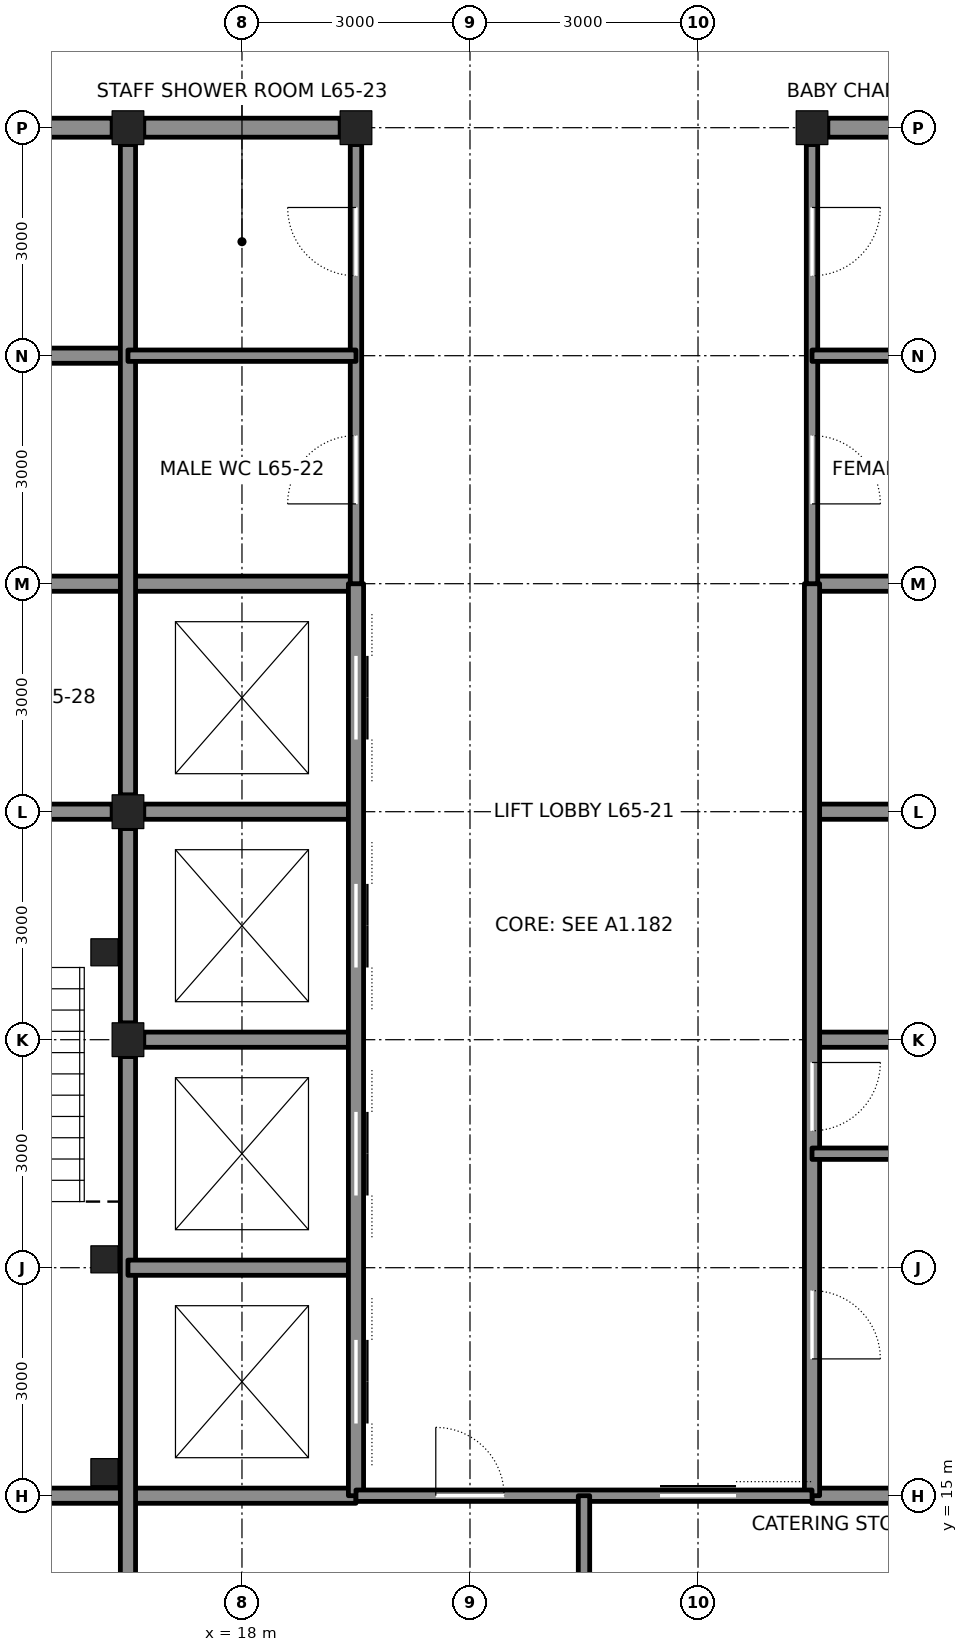
"""IFC4 building model, lengths in metres.
Left out: names, types, materials, properties, quantities, classifications, styles, units other than length and angle.
Written with IfcOpenShell. Run it as: python <this file> out.ifc"""

import sys

from ifc_helpers import new_model, si_unit, direction, frame, frame_2d, origin, origin_2d, place, context, subcontext, project, spatial, rectangle, hollow_rectangle, i_section, extrude, element, fill, save


model = new_model("IFC4")
c1 = context("Model", 3, precision=1e-05, world=origin(), true_north=direction((0.0, 1.0)))
c2 = subcontext(c1, "Body", "Model", "MODEL_VIEW")
j1 = project(units=[si_unit("LENGTHUNIT", "METRE"), si_unit("PLANEANGLEUNIT", "RADIAN")], contexts=[c1])
p1 = place(None, origin())
s1 = spatial("IfcSite", under=j1, at=p1, CompositionType="ELEMENT")
p2 = place(p1, origin())
s2 = spatial("IfcBuilding", under=s1, at=p2, CompositionType="ELEMENT")
p3 = place(p2, frame((0.0, 0.0, 291.6)))
s3 = spatial("IfcBuildingStorey", under=s2, at=p3, CompositionType="ELEMENT", Elevation=291.6)
for number, where, z_axis, x_axis in (
    (1, (16.5, 33.0, 0.0), (0.0, 0.0, 1.0), (1.0, 0.0, 0.0)),
    (2, (19.5, 33.0, 0.0), (0.0, 0.0, 1.0), (1.0, 0.0, 0.0)),
    (3, (25.5, 33.0, 0.0), (0.0, 0.0, 1.0), (1.0, 0.0, 0.0)),
    (4, (16.5, 21.0, 0.0), (0.0, 0.0, 1.0), (1.0, 0.0, 0.0)),
    (5, (16.5, 24.0, 0.0), (0.0, 0.0, 1.0), (1.0, 0.0, 0.0)),
):
    element("IfcColumn", number, at=place(p3, frame(where, z_axis=z_axis, x_axis=x_axis)), inside=s3, PredefinedType="COLUMN", context=c2, shape_type="SweptSolid", body=[
        extrude(i_section(OverallWidth=0.417, OverallDepth=0.445, WebThickness=0.039, FlangeThickness=0.063, at=origin_2d()), origin(), (0.0, 0.0, 1.0), 4.2),
    ])
for number, where, z_axis, x_axis in (
    (6, (12.0, 15.0, 0.0), (0.0, 0.0, 1.0), (1.0, 0.0, 0.0)),
    (7, (25.5, 15.0, 0.0), (0.0, 0.0, 1.0), (1.0, 0.0, 0.0)),
):
    element("IfcWall", number, at=place(p3, frame(where, z_axis=z_axis, x_axis=x_axis)), inside=s3, PredefinedType="SOLIDWALL", context=c2, shape_type="SweptSolid", body=[
        extrude(rectangle(XDim=7.5, YDim=0.2, at=frame_2d((3.75, 0.0))), origin(), (0.0, 0.0, 1.0), 4.04),
    ])
p4 = place(p3, frame((12.208, 24.0, 0.0), z_axis=(0.0, 0.0, 1.0), x_axis=(1.0, 0.0, 0.0)))
e8 = element("IfcWall", 8, at=p4, inside=s3, PredefinedType="SOLIDWALL", context=c2, shape_type="SweptSolid", body=[
    extrude(rectangle(XDim=4.083, YDim=0.2, at=frame_2d((2.042, 0.0))), origin(), (0.0, 0.0, 1.0), 3.09),
])
p5 = place(p4, frame((1.442, 0.0, 0.0)))
e9 = element("IfcOpeningElement", 9, at=p5, cuts=e8, PredefinedType="OPENING", context=c2, shape_type="SweptSolid", body=[
    extrude(rectangle(XDim=1.2, YDim=2.1, at=frame_2d((0.6, 1.05))), frame((0.0, 0.11, 0.0), z_axis=(0.0, -1.0, 0.0), x_axis=(1.0, 0.0, 0.0)), (0.0, 0.0, 1.0), 0.22),
])
for number, where, z_axis, x_axis in (
    (10, (16.708, 24.0, 0.0), (0.0, 0.0, 1.0), (1.0, 0.0, 0.0)),
    (11, (25.5, 24.0, 0.0), (0.0, 0.0, 1.0), (1.0, 0.0, 0.0)),
):
    element("IfcWall", number, at=place(p3, frame(where, z_axis=z_axis, x_axis=x_axis)), inside=s3, PredefinedType="SOLIDWALL", context=c2, shape_type="SweptSolid", body=[
        extrude(rectangle(XDim=2.792, YDim=0.2, at=frame_2d((1.396, 0.0))), origin(), (0.0, 0.0, 1.0), 3.09),
    ])
p6 = place(p3, frame((12.0, 27.0, 0.0), z_axis=(0.0, 0.0, 1.0), x_axis=(1.0, 0.0, 0.0)))
e12 = element("IfcWall", 12, at=p6, inside=s3, PredefinedType="SOLIDWALL", context=c2, shape_type="SweptSolid", body=[
    extrude(rectangle(XDim=7.5, YDim=0.2, at=frame_2d((3.75, 0.0))), origin(), (0.0, 0.0, 1.0), 4.04),
])
p7 = place(p6, frame((1.65, 0.0, 0.0)))
e13 = element("IfcOpeningElement", 13, at=p7, cuts=e12, PredefinedType="OPENING", context=c2, shape_type="SweptSolid", body=[
    extrude(rectangle(XDim=1.2, YDim=2.1, at=frame_2d((0.6, 1.05))), frame((0.0, 0.11, 0.0), z_axis=(0.0, -1.0, 0.0), x_axis=(1.0, 0.0, 0.0)), (0.0, 0.0, 1.0), 0.22),
])
p8 = place(p3, frame((25.5, 27.0, 0.0), z_axis=(0.0, 0.0, 1.0), x_axis=(1.0, 0.0, 0.0)))
e14 = element("IfcWall", 14, at=p8, inside=s3, PredefinedType="SOLIDWALL", context=c2, shape_type="SweptSolid", body=[
    extrude(rectangle(XDim=3.0, YDim=0.2, at=frame_2d((1.5, 0.0))), origin(), (0.0, 0.0, 1.0), 4.04),
])
p9 = place(p3, frame((12.0, 30.0, 0.0), z_axis=(0.0, 0.0, 1.0), x_axis=(1.0, 0.0, 0.0)))
e15 = element("IfcWall", 15, at=p9, inside=s3, PredefinedType="SOLIDWALL", context=c2, shape_type="SweptSolid", body=[
    extrude(rectangle(XDim=4.5, YDim=0.2, at=frame_2d((2.25, 0.0))), origin(), (0.0, 0.0, 1.0), 4.04),
])
p10 = place(p3, frame((12.25, 33.0, 0.0), z_axis=(0.0, 0.0, 1.0), x_axis=(1.0, 0.0, 0.0)))
e16 = element("IfcWall", 16, at=p10, inside=s3, PredefinedType="SOLIDWALL", context=c2, shape_type="SweptSolid", body=[
    extrude(rectangle(XDim=4.042, YDim=0.25, at=frame_2d((2.021, 0.0))), origin(), (0.0, 0.0, 1.0), 3.181),
])
for number, where, z_axis, x_axis in (
    (17, (16.708, 33.0, 0.0), (0.0, 0.0, 1.0), (1.0, 0.0, 0.0)),
    (18, (25.708, 33.0, 0.0), (0.0, 0.0, 1.0), (1.0, 0.0, 0.0)),
):
    element("IfcWall", number, at=place(p3, frame(where, z_axis=z_axis, x_axis=x_axis)), inside=s3, PredefinedType="SOLIDWALL", context=c2, shape_type="SweptSolid", body=[
        extrude(rectangle(XDim=2.583, YDim=0.25, at=frame_2d((1.292, 0.0))), origin(), (0.0, 0.0, 1.0), 3.181),
    ])
p11 = place(p3, frame((16.5, 12.222, 0.0), z_axis=(0.0, 0.0, 1.0), x_axis=(0.0, 1.0, 0.0)))
e19 = element("IfcWall", 19, at=p11, inside=s3, PredefinedType="SOLIDWALL", context=c2, shape_type="SweptSolid", body=[
    extrude(rectangle(XDim=8.555, YDim=0.2, at=frame_2d((4.278, 0.0))), origin(), (0.0, 0.0, 1.0), 3.113),
])
p12 = place(p3, frame((16.5, 21.222, 0.0), z_axis=(0.0, 0.0, 1.0), x_axis=(0.0, 1.0, 0.0)))
e20 = element("IfcWall", 20, at=p12, inside=s3, PredefinedType="SOLIDWALL", context=c2, shape_type="SweptSolid", body=[
    extrude(rectangle(XDim=2.555, YDim=0.2, at=frame_2d((1.278, 0.0))), origin(), (0.0, 0.0, 1.0), 3.113),
])
p13 = place(p3, frame((16.5, 24.222, 0.0), z_axis=(0.0, 0.0, 1.0), x_axis=(0.0, 1.0, 0.0)))
e21 = element("IfcWall", 21, at=p13, inside=s3, PredefinedType="SOLIDWALL", context=c2, shape_type="SweptSolid", body=[
    extrude(rectangle(XDim=8.555, YDim=0.2, at=frame_2d((4.278, 0.0))), origin(), (0.0, 0.0, 1.0), 3.113),
])
p14 = place(p3, frame((16.5, 18.0, 0.0), z_axis=(0.0, 0.0, 1.0), x_axis=(1.0, 0.0, 0.0)))
e22 = element("IfcWall", 22, at=p14, inside=s3, PredefinedType="SOLIDWALL", context=c2, shape_type="SweptSolid", body=[
    extrude(rectangle(XDim=3.0, YDim=0.2, at=frame_2d((1.5, 0.0))), origin(), (0.0, 0.0, 1.0), 4.04),
])
for number, where, z_axis, x_axis in (
    (23, (16.708, 21.0, 0.0), (0.0, 0.0, 1.0), (1.0, 0.0, 0.0)),
    (24, (25.5, 21.0, 0.0), (0.0, 0.0, 1.0), (1.0, 0.0, 0.0)),
):
    element("IfcWall", number, at=place(p3, frame(where, z_axis=z_axis, x_axis=x_axis)), inside=s3, PredefinedType="SOLIDWALL", context=c2, shape_type="SweptSolid", body=[
        extrude(rectangle(XDim=2.792, YDim=0.2, at=frame_2d((1.396, 0.0))), origin(), (0.0, 0.0, 1.0), 3.09),
    ])
p15 = place(p3, frame((19.5, 15.0, 0.0), z_axis=(0.0, 0.0, 1.0), x_axis=(0.0, 1.0, 0.0)))
e25 = element("IfcWall", 25, at=p15, inside=s3, PredefinedType="SOLIDWALL", context=c2, shape_type="SweptSolid", body=[
    extrude(rectangle(XDim=12.0, YDim=0.2, at=frame_2d((6.0, 0.0))), origin(), (0.0, 0.0, 1.0), 3.064),
])
p16 = place(p15, frame((0.95, 0.0, 0.0)))
e26 = element("IfcOpeningElement", 26, at=p16, cuts=e25, PredefinedType="OPENING", context=c2, shape_type="SweptSolid", body=[
    extrude(rectangle(XDim=1.1, YDim=2.1, at=frame_2d((0.55, 1.05))), frame((0.0, 0.11, 0.0), z_axis=(0.0, -1.0, 0.0), x_axis=(1.0, 0.0, 0.0)), (0.0, 0.0, 1.0), 0.22),
])
p17 = place(p15, frame((3.95, 0.0, 0.0)))
e27 = element("IfcOpeningElement", 27, at=p17, cuts=e25, PredefinedType="OPENING", context=c2, shape_type="SweptSolid", body=[
    extrude(rectangle(XDim=1.1, YDim=2.1, at=frame_2d((0.55, 1.05))), frame((0.0, 0.11, 0.0), z_axis=(0.0, -1.0, 0.0), x_axis=(1.0, 0.0, 0.0)), (0.0, 0.0, 1.0), 0.22),
])
p18 = place(p15, frame((6.95, 0.0, 0.0)))
e28 = element("IfcOpeningElement", 28, at=p18, cuts=e25, PredefinedType="OPENING", context=c2, shape_type="SweptSolid", body=[
    extrude(rectangle(XDim=1.1, YDim=2.1, at=frame_2d((0.55, 1.05))), frame((0.0, 0.11, 0.0), z_axis=(0.0, -1.0, 0.0), x_axis=(1.0, 0.0, 0.0)), (0.0, 0.0, 1.0), 0.22),
])
p19 = place(p15, frame((9.95, 0.0, 0.0)))
e29 = element("IfcOpeningElement", 29, at=p19, cuts=e25, PredefinedType="OPENING", context=c2, shape_type="SweptSolid", body=[
    extrude(rectangle(XDim=1.1, YDim=2.1, at=frame_2d((0.55, 1.05))), frame((0.0, 0.11, 0.0), z_axis=(0.0, -1.0, 0.0), x_axis=(1.0, 0.0, 0.0)), (0.0, 0.0, 1.0), 0.22),
])
p20 = place(p3, frame((19.5, 27.0, 0.0), z_axis=(0.0, 0.0, 1.0), x_axis=(0.0, 1.0, 0.0)))
e30 = element("IfcWall", 30, at=p20, inside=s3, PredefinedType="PARTITIONING", context=c2, shape_type="SweptSolid", body=[
    extrude(rectangle(XDim=5.778, YDim=0.15, at=frame_2d((2.889, 0.0))), origin(), (0.0, 0.0, 1.0), 3.064),
])
p21 = place(p20, frame((1.05, 0.0, 0.0)))
e31 = element("IfcOpeningElement", 31, at=p21, cuts=e30, PredefinedType="OPENING", context=c2, shape_type="SweptSolid", body=[
    extrude(rectangle(XDim=0.9, YDim=2.1, at=frame_2d((0.45, 1.05))), frame((0.0, 0.085, 0.0), z_axis=(0.0, -1.0, 0.0), x_axis=(1.0, 0.0, 0.0)), (0.0, 0.0, 1.0), 0.17),
])
p22 = place(p20, frame((4.05, 0.0, 0.0)))
e32 = element("IfcOpeningElement", 32, at=p22, cuts=e30, PredefinedType="OPENING", context=c2, shape_type="SweptSolid", body=[
    extrude(rectangle(XDim=0.9, YDim=2.1, at=frame_2d((0.45, 1.05))), frame((0.0, 0.085, 0.0), z_axis=(0.0, -1.0, 0.0), x_axis=(1.0, 0.0, 0.0)), (0.0, 0.0, 1.0), 0.17),
])
p23 = place(p3, frame((25.5, 15.0, 0.0), z_axis=(0.0, 0.0, 1.0), x_axis=(0.0, 1.0, 0.0)))
e33 = element("IfcWall", 33, at=p23, inside=s3, PredefinedType="SOLIDWALL", context=c2, shape_type="SweptSolid", body=[
    extrude(rectangle(XDim=12.0, YDim=0.2, at=frame_2d((6.0, 0.0))), origin(), (0.0, 0.0, 1.0), 3.064),
])
p24 = place(p23, frame((1.8, 0.0, 0.0)))
e34 = element("IfcOpeningElement", 34, at=p24, cuts=e33, PredefinedType="OPENING", context=c2, shape_type="SweptSolid", body=[
    extrude(rectangle(XDim=0.9, YDim=2.1, at=frame_2d((0.45, 1.05))), frame((0.0, 0.11, 0.0), z_axis=(0.0, -1.0, 0.0), x_axis=(1.0, 0.0, 0.0)), (0.0, 0.0, 1.0), 0.22),
])
p25 = place(p23, frame((4.8, 0.0, 0.0)))
e35 = element("IfcOpeningElement", 35, at=p25, cuts=e33, PredefinedType="OPENING", context=c2, shape_type="SweptSolid", body=[
    extrude(rectangle(XDim=0.9, YDim=2.1, at=frame_2d((0.45, 1.05))), frame((0.0, 0.11, 0.0), z_axis=(0.0, -1.0, 0.0), x_axis=(1.0, 0.0, 0.0)), (0.0, 0.0, 1.0), 0.22),
])
p26 = place(p3, frame((25.5, 27.0, 0.0), z_axis=(0.0, 0.0, 1.0), x_axis=(0.0, 1.0, 0.0)))
e36 = element("IfcWall", 36, at=p26, inside=s3, PredefinedType="PARTITIONING", context=c2, shape_type="SweptSolid", body=[
    extrude(rectangle(XDim=5.778, YDim=0.15, at=frame_2d((2.889, 0.0))), origin(), (0.0, 0.0, 1.0), 3.064),
])
p27 = place(p26, frame((1.05, 0.0, 0.0)))
e37 = element("IfcOpeningElement", 37, at=p27, cuts=e36, PredefinedType="OPENING", context=c2, shape_type="SweptSolid", body=[
    extrude(rectangle(XDim=0.9, YDim=2.1, at=frame_2d((0.45, 1.05))), frame((0.0, 0.085, 0.0), z_axis=(0.0, -1.0, 0.0), x_axis=(1.0, 0.0, 0.0)), (0.0, 0.0, 1.0), 0.17),
])
p28 = place(p26, frame((4.05, 0.0, 0.0)))
e38 = element("IfcOpeningElement", 38, at=p28, cuts=e36, PredefinedType="OPENING", context=c2, shape_type="SweptSolid", body=[
    extrude(rectangle(XDim=0.9, YDim=2.1, at=frame_2d((0.45, 1.05))), frame((0.0, 0.085, 0.0), z_axis=(0.0, -1.0, 0.0), x_axis=(1.0, 0.0, 0.0)), (0.0, 0.0, 1.0), 0.17),
])
p29 = place(p3, frame((19.5, 15.0, 0.0), z_axis=(0.0, 0.0, 1.0), x_axis=(1.0, 0.0, 0.0)))
e39 = element("IfcWall", 39, at=p29, inside=s3, PredefinedType="PARTITIONING", context=c2, shape_type="SweptSolid", body=[
    extrude(rectangle(XDim=6.0, YDim=0.15, at=frame_2d((3.0, 0.0))), origin(), (0.0, 0.0, 1.0), 4.04),
])
p30 = place(p29, frame((4.0, 0.0, 0.0)))
e40 = element("IfcOpeningElement", 40, at=p30, cuts=e39, PredefinedType="OPENING", context=c2, shape_type="SweptSolid", body=[
    extrude(rectangle(XDim=1.0, YDim=2.1, at=frame_2d((0.5, 1.05))), frame((0.0, 0.085, 0.0), z_axis=(0.0, -1.0, 0.0), x_axis=(1.0, 0.0, 0.0)), (0.0, 0.0, 1.0), 0.17),
])
p31 = place(p29, frame((1.05, 0.0, 0.0)))
e41 = element("IfcOpeningElement", 41, at=p31, cuts=e39, PredefinedType="OPENING", context=c2, shape_type="SweptSolid", body=[
    extrude(rectangle(XDim=0.9, YDim=2.1, at=frame_2d((0.45, 1.05))), frame((0.0, 0.085, 0.0), z_axis=(0.0, -1.0, 0.0), x_axis=(1.0, 0.0, 0.0)), (0.0, 0.0, 1.0), 0.17),
])
for number, where, z_axis, x_axis in (
    (42, (22.5, 15.0, 0.0), (0.0, 0.0, 1.0), (0.0, -1.0, 0.0)),
    (43, (16.5, 30.0, 0.0), (0.0, 0.0, 1.0), (1.0, 0.0, 0.0)),
    (44, (25.5, 30.0, 0.0), (0.0, 0.0, 1.0), (1.0, 0.0, 0.0)),
    (45, (25.5, 19.5, 0.0), (0.0, 0.0, 1.0), (1.0, 0.0, 0.0)),
):
    element("IfcWall", number, at=place(p3, frame(where, z_axis=z_axis, x_axis=x_axis)), inside=s3, PredefinedType="PARTITIONING", context=c2, shape_type="SweptSolid", body=[
        extrude(rectangle(XDim=3.0, YDim=0.15, at=frame_2d((1.5, 0.0))), origin(), (0.0, 0.0, 1.0), 4.04),
    ])
for number, where, z_axis, x_axis in (
    (46, (16.19, 15.31, 0.0), (0.0, 0.0, 1.0), (1.0, 0.0, 0.0)),
    (47, (16.19, 18.11, 0.0), (0.0, 0.0, 1.0), (1.0, 0.0, 0.0)),
    (48, (16.19, 22.15, 0.0), (0.0, 0.0, 1.0), (1.0, 0.0, 0.0)),
):
    element("IfcColumn", number, at=place(p3, frame(where, z_axis=z_axis, x_axis=x_axis)), inside=s3, PredefinedType="COLUMN", context=c2, shape_type="SweptSolid", body=[
        extrude(hollow_rectangle(XDim=0.356, YDim=0.356, WallThickness=0.009, at=origin_2d()), origin(), (0.0, 0.0, 1.0), 4.2),
    ])
p32 = place(p21, origin())
e49 = element("IfcDoor", 49, at=p32, inside=s3, OperationType="SINGLE_SWING_LEFT", PredefinedType="DOOR", context=c2, shape_type="SweptSolid", body=[
    extrude(rectangle(XDim=0.9, YDim=2.1, at=frame_2d((0.45, 1.05))), frame((0.0, 0.025, 0.0), z_axis=(0.0, -1.0, 0.0), x_axis=(1.0, 0.0, 0.0)), (0.0, 0.0, 1.0), 0.05),
])
fill(e31, e49)
p33 = place(p22, origin())
e50 = element("IfcDoor", 50, at=p33, inside=s3, OperationType="SINGLE_SWING_RIGHT", PredefinedType="DOOR", context=c2, shape_type="SweptSolid", body=[
    extrude(rectangle(XDim=0.9, YDim=2.1, at=frame_2d((0.45, 1.05))), frame((0.0, 0.025, 0.0), z_axis=(0.0, -1.0, 0.0), x_axis=(1.0, 0.0, 0.0)), (0.0, 0.0, 1.0), 0.05),
])
fill(e32, e50)
p34 = place(p27, frame((0.9, 0.0, 0.0), z_axis=(0.0, 0.0, 1.0), x_axis=(-1.0, 0.0, 0.0)))
e51 = element("IfcDoor", 51, at=p34, inside=s3, OperationType="SINGLE_SWING_RIGHT", PredefinedType="DOOR", context=c2, shape_type="SweptSolid", body=[
    extrude(rectangle(XDim=0.9, YDim=2.1, at=frame_2d((0.45, 1.05))), frame((0.0, 0.025, 0.0), z_axis=(0.0, -1.0, 0.0), x_axis=(1.0, 0.0, 0.0)), (0.0, 0.0, 1.0), 0.05),
])
fill(e37, e51)
p35 = place(p28, frame((0.9, 0.0, 0.0), z_axis=(0.0, 0.0, 1.0), x_axis=(-1.0, 0.0, 0.0)))
e52 = element("IfcDoor", 52, at=p35, inside=s3, OperationType="SINGLE_SWING_LEFT", PredefinedType="DOOR", context=c2, shape_type="SweptSolid", body=[
    extrude(rectangle(XDim=0.9, YDim=2.1, at=frame_2d((0.45, 1.05))), frame((0.0, 0.025, 0.0), z_axis=(0.0, -1.0, 0.0), x_axis=(1.0, 0.0, 0.0)), (0.0, 0.0, 1.0), 0.05),
])
fill(e38, e52)
p36 = place(p30, origin())
e53 = element("IfcDoor", 53, at=p36, inside=s3, OperationType="SLIDING_TO_LEFT", PredefinedType="DOOR", context=c2, shape_type="SweptSolid", body=[
    extrude(rectangle(XDim=1.0, YDim=2.1, at=frame_2d((0.5, 1.05))), frame((0.0, 0.025, 0.0), z_axis=(0.0, -1.0, 0.0), x_axis=(1.0, 0.0, 0.0)), (0.0, 0.0, 1.0), 0.05),
])
fill(e40, e53)
p37 = place(p24, frame((0.9, 0.0, 0.0), z_axis=(0.0, 0.0, 1.0), x_axis=(-1.0, 0.0, 0.0)))
e54 = element("IfcDoor", 54, at=p37, inside=s3, OperationType="SINGLE_SWING_RIGHT", PredefinedType="DOOR", context=c2, shape_type="SweptSolid", body=[
    extrude(rectangle(XDim=0.9, YDim=2.1, at=frame_2d((0.45, 1.05))), frame((0.0, 0.025, 0.0), z_axis=(0.0, -1.0, 0.0), x_axis=(1.0, 0.0, 0.0)), (0.0, 0.0, 1.0), 0.05),
])
fill(e34, e54)
p38 = place(p25, frame((0.9, 0.0, 0.0), z_axis=(0.0, 0.0, 1.0), x_axis=(-1.0, 0.0, 0.0)))
e55 = element("IfcDoor", 55, at=p38, inside=s3, OperationType="SINGLE_SWING_LEFT", PredefinedType="DOOR", context=c2, shape_type="SweptSolid", body=[
    extrude(rectangle(XDim=0.9, YDim=2.1, at=frame_2d((0.45, 1.05))), frame((0.0, 0.025, 0.0), z_axis=(0.0, -1.0, 0.0), x_axis=(1.0, 0.0, 0.0)), (0.0, 0.0, 1.0), 0.05),
])
fill(e35, e55)
p39 = place(p31, origin())
e56 = element("IfcDoor", 56, at=p39, inside=s3, OperationType="SINGLE_SWING_LEFT", PredefinedType="DOOR", context=c2, shape_type="SweptSolid", body=[
    extrude(rectangle(XDim=0.9, YDim=2.1, at=frame_2d((0.45, 1.05))), frame((0.0, 0.025, 0.0), z_axis=(0.0, -1.0, 0.0), x_axis=(1.0, 0.0, 0.0)), (0.0, 0.0, 1.0), 0.05),
])
fill(e41, e56)
p40 = place(p16, origin())
e57 = element("IfcDoor", 57, at=p40, inside=s3, OperationType="DOUBLE_DOOR_SLIDING", PredefinedType="DOOR", context=c2, shape_type="SweptSolid", body=[
    extrude(rectangle(XDim=1.1, YDim=2.1, at=frame_2d((0.55, 1.05))), frame((0.0, 0.025, 0.0), z_axis=(0.0, -1.0, 0.0), x_axis=(1.0, 0.0, 0.0)), (0.0, 0.0, 1.0), 0.05),
])
fill(e26, e57)
p41 = place(p17, origin())
e58 = element("IfcDoor", 58, at=p41, inside=s3, OperationType="DOUBLE_DOOR_SLIDING", PredefinedType="DOOR", context=c2, shape_type="SweptSolid", body=[
    extrude(rectangle(XDim=1.1, YDim=2.1, at=frame_2d((0.55, 1.05))), frame((0.0, 0.025, 0.0), z_axis=(0.0, -1.0, 0.0), x_axis=(1.0, 0.0, 0.0)), (0.0, 0.0, 1.0), 0.05),
])
fill(e27, e58)
p42 = place(p18, origin())
e59 = element("IfcDoor", 59, at=p42, inside=s3, OperationType="DOUBLE_DOOR_SLIDING", PredefinedType="DOOR", context=c2, shape_type="SweptSolid", body=[
    extrude(rectangle(XDim=1.1, YDim=2.1, at=frame_2d((0.55, 1.05))), frame((0.0, 0.025, 0.0), z_axis=(0.0, -1.0, 0.0), x_axis=(1.0, 0.0, 0.0)), (0.0, 0.0, 1.0), 0.05),
])
fill(e28, e59)
p43 = place(p19, origin())
e60 = element("IfcDoor", 60, at=p43, inside=s3, OperationType="DOUBLE_DOOR_SLIDING", PredefinedType="DOOR", context=c2, shape_type="SweptSolid", body=[
    extrude(rectangle(XDim=1.1, YDim=2.1, at=frame_2d((0.55, 1.05))), frame((0.0, 0.025, 0.0), z_axis=(0.0, -1.0, 0.0), x_axis=(1.0, 0.0, 0.0)), (0.0, 0.0, 1.0), 0.05),
])
fill(e29, e60)
save(model, sys.argv[1])
